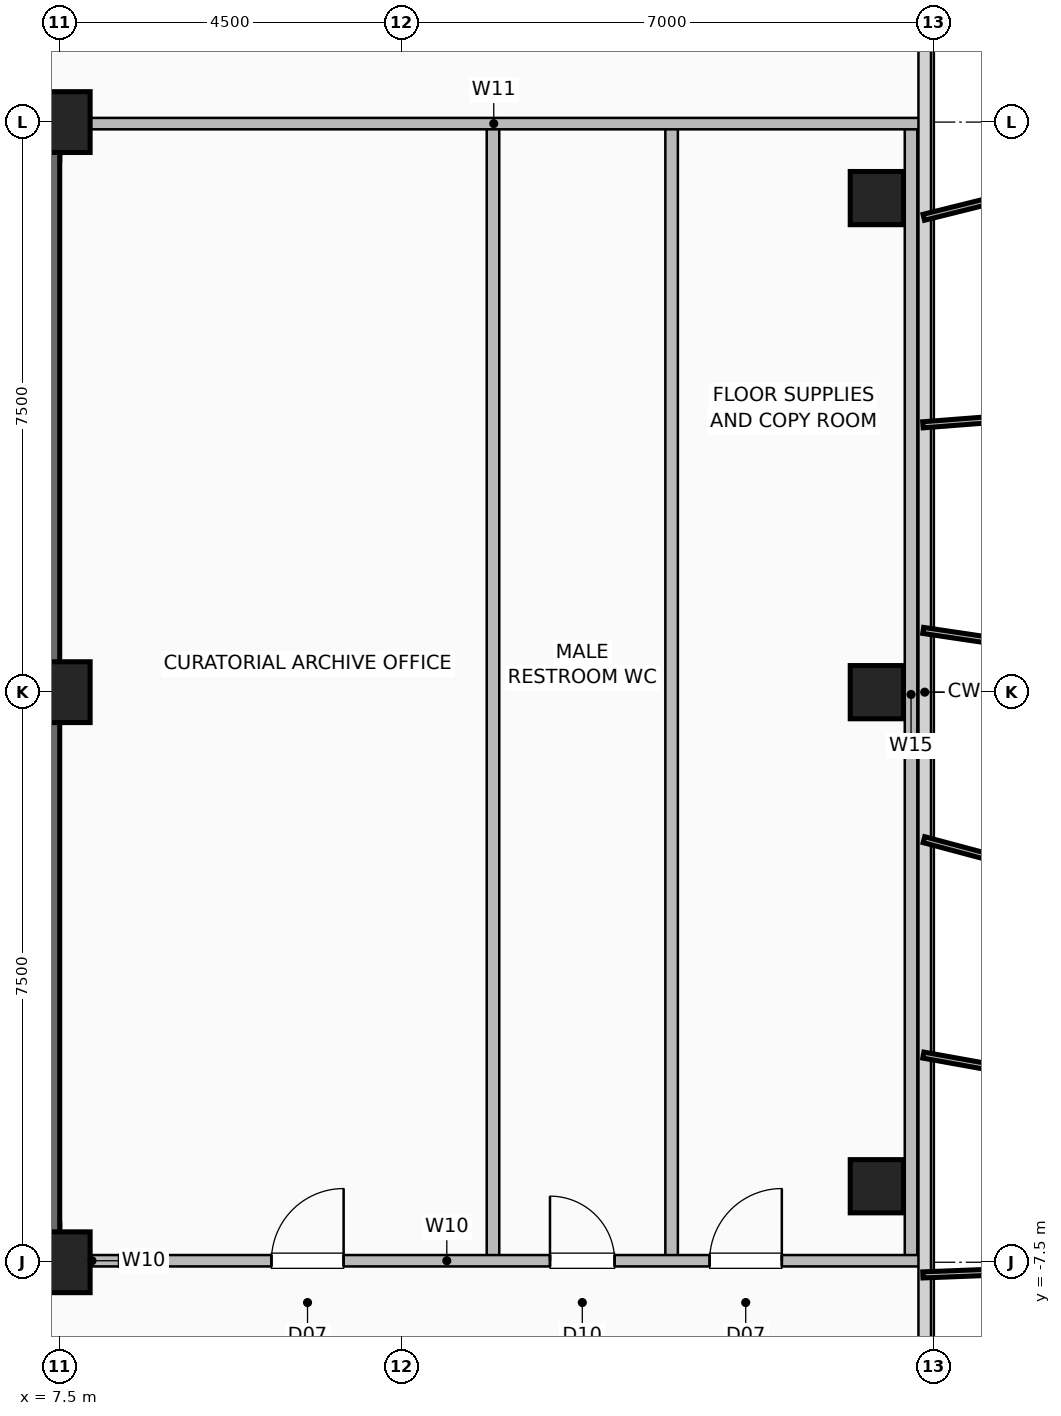
"""IFC4 building model, lengths in metres.
Left out: names, types, materials, properties, quantities, classifications, styles, units other than length and angle.
Written with IfcOpenShell. Run it as: python <this file> out.ifc"""

import sys

from ifc_helpers import new_model, si_unit, direction, frame, frame_2d, origin, origin_2d, place, context, subcontext, project, spatial, rectangle, hollow_rectangle, extrude, element, fill, save


model = new_model("IFC4")
c1 = context("Model", 3, precision=1e-05, world=origin(), true_north=direction((0.0, 1.0)))
c2 = subcontext(c1, "Body", "Model", "MODEL_VIEW")
j1 = project(units=[si_unit("LENGTHUNIT", "METRE"), si_unit("PLANEANGLEUNIT", "RADIAN")], contexts=[c1])
p1 = place(None, origin())
s1 = spatial("IfcSite", under=j1, at=p1, CompositionType="ELEMENT")
p2 = place(p1, origin())
s2 = spatial("IfcBuilding", under=s1, at=p2, CompositionType="ELEMENT")
p3 = place(p2, frame((0.0, 0.0, 272.0)))
s3 = spatial("IfcBuildingStorey", under=s2, at=p3, CompositionType="ELEMENT", Elevation=272.0)
for number, where, z_axis, x_axis in (
    (1, (7.5, -7.5, 0.0), (0.0, 0.0, 1.0), (1.0, 0.0, 0.0)),
    (2, (7.5, 0.0, 0.0), (0.0, 0.0, 1.0), (1.0, 0.0, 0.0)),
    (3, (7.5, 7.5, 0.0), (0.0, 0.0, 1.0), (1.0, 0.0, 0.0)),
):
    element("IfcColumn", number, at=place(p3, frame(where, z_axis=z_axis, x_axis=x_axis)), inside=s3, PredefinedType="COLUMN", context=c2, shape_type="SweptSolid", body=[
        extrude(hollow_rectangle(XDim=0.8, YDim=0.8, WallThickness=0.04, at=origin_2d()), origin(), (0.0, 0.0, 1.0), 3.6),
    ])
for number, where, z_axis, x_axis in (
    (4, (18.25, -6.5, 0.0), (0.0, 0.0, 1.0), (1.0, 0.0, 0.0)),
    (5, (18.25, 0.0, 0.0), (0.0, 0.0, 1.0), (1.0, 0.0, 0.0)),
    (6, (18.25, 6.5, 0.0), (0.0, 0.0, 1.0), (1.0, 0.0, 0.0)),
):
    element("IfcColumn", number, at=place(p3, frame(where, z_axis=z_axis, x_axis=x_axis)), inside=s3, PredefinedType="COLUMN", context=c2, shape_type="SweptSolid", body=[
        extrude(hollow_rectangle(XDim=0.7, YDim=0.7, WallThickness=0.035, at=origin_2d()), origin(), (0.0, 0.0, 1.0), 3.6),
    ])
p4 = place(p3, frame((-7.5, -7.25, 0.0), z_axis=(0.0, 0.0, 1.0), x_axis=(1.0, 0.0, 0.0)))
e7 = element("IfcWall", 7, at=p4, inside=s3, PredefinedType="SHEAR", context=c2, shape_type="SweptSolid", body=[
    extrude(rectangle(XDim=15.0, YDim=0.5, at=frame_2d((7.5, 0.0))), origin(), (0.0, 0.0, 1.0), 3.36),
])
p5 = place(p4, frame((1.55, 0.0, 0.0)))
e8 = element("IfcOpeningElement", 8, at=p5, cuts=e7, PredefinedType="OPENING", context=c2, shape_type="SweptSolid", body=[
    extrude(rectangle(XDim=1.05, YDim=2.08, at=frame_2d((0.525, 1.04))), frame((0.0, 0.26, 0.0), z_axis=(0.0, -1.0, 0.0), x_axis=(1.0, 0.0, 0.0)), (0.0, 0.0, 1.0), 0.52),
])
p6 = place(p4, frame((12.4, 0.0, 0.0)))
e9 = element("IfcOpeningElement", 9, at=p6, cuts=e7, PredefinedType="OPENING", context=c2, shape_type="SweptSolid", body=[
    extrude(rectangle(XDim=1.05, YDim=2.08, at=frame_2d((0.525, 1.04))), frame((0.0, 0.26, 0.0), z_axis=(0.0, -1.0, 0.0), x_axis=(1.0, 0.0, 0.0)), (0.0, 0.0, 1.0), 0.52),
])
p7 = place(p4, frame((5.2, 0.0, 0.0)))
e10 = element("IfcOpeningElement", 10, at=p7, cuts=e7, PredefinedType="OPENING", context=c2, shape_type="SweptSolid", body=[
    extrude(rectangle(XDim=1.0, YDim=2.08, at=frame_2d((0.5, 1.04))), frame((0.0, 0.26, 0.0), z_axis=(0.0, -1.0, 0.0), x_axis=(1.0, 0.0, 0.0)), (0.0, 0.0, 1.0), 0.52),
])
p8 = place(p4, frame((8.65, 0.0, 0.0)))
e11 = element("IfcOpeningElement", 11, at=p8, cuts=e7, PredefinedType="OPENING", context=c2, shape_type="SweptSolid", body=[
    extrude(rectangle(XDim=1.0, YDim=2.08, at=frame_2d((0.5, 1.04))), frame((0.0, 0.26, 0.0), z_axis=(0.0, -1.0, 0.0), x_axis=(1.0, 0.0, 0.0)), (0.0, 0.0, 1.0), 0.52),
])
for number, where, z_axis, x_axis in (
    (12, (-7.5, 7.25, 0.0), (0.0, 0.0, 1.0), (1.0, 0.0, 0.0)),
    (13, (7.25, -7.5, 0.0), (0.0, 0.0, 1.0), (0.0, 1.0, 0.0)),
):
    element("IfcWall", number, at=place(p3, frame(where, z_axis=z_axis, x_axis=x_axis)), inside=s3, PredefinedType="SHEAR", context=c2, shape_type="SweptSolid", body=[
        extrude(rectangle(XDim=15.0, YDim=0.5, at=frame_2d((7.5, 0.0))), origin(), (0.0, 0.0, 1.0), 3.36),
    ])
p9 = place(p3, frame((7.45, -7.48, 0.0), z_axis=(0.0, 0.0, 1.0), x_axis=(1.0, 0.0, 0.0)))
e14 = element("IfcWall", 14, at=p9, inside=s3, PredefinedType="PARTITIONING", context=c2, shape_type="SweptSolid", body=[
    extrude(rectangle(XDim=0.95, YDim=0.15, at=frame_2d((0.475, 0.0))), origin(), (0.0, 0.0, 1.0), 3.36),
])
for number, where, z_axis, x_axis in (
    (15, (15.55, -7.48, 0.0), (0.0, 0.0, 1.0), (0.0, 1.0, 0.0)),
    (16, (13.2, -7.48, 0.0), (0.0, 0.0, 1.0), (0.0, 1.0, 0.0)),
    (17, (18.7, -7.48, 0.0), (0.0, 0.0, 1.0), (0.0, 1.0, 0.0)),
):
    element("IfcWall", number, at=place(p3, frame(where, z_axis=z_axis, x_axis=x_axis)), inside=s3, PredefinedType="PLUMBINGWALL", context=c2, shape_type="SweptSolid", body=[
        extrude(rectangle(XDim=14.9, YDim=0.165, at=frame_2d((7.45, 0.0))), origin(), (0.0, 0.0, 1.0), 3.36),
    ])
p10 = place(p3, frame((8.28, -7.48, 0.0), z_axis=(0.0, 0.0, 1.0), x_axis=(1.0, 0.0, 0.0)))
e18 = element("IfcWall", 18, at=p10, inside=s3, PredefinedType="PARTITIONING", context=c2, shape_type="SweptSolid", body=[
    extrude(rectangle(XDim=10.54, YDim=0.15, at=frame_2d((5.27, 0.0))), origin(), (0.0, 0.0, 1.0), 3.36),
])
p11 = place(p10, frame((2.005, 0.0, 0.0)))
e19 = element("IfcOpeningElement", 19, at=p11, cuts=e18, PredefinedType="OPENING", context=c2, shape_type="SweptSolid", body=[
    extrude(rectangle(XDim=0.95, YDim=2.06, at=frame_2d((0.475, 1.03))), frame((0.0, 0.085, 0.0), z_axis=(0.0, -1.0, 0.0), x_axis=(1.0, 0.0, 0.0)), (0.0, 0.0, 1.0), 0.17),
])
p12 = place(p10, frame((5.67, 0.0, 0.0)))
e20 = element("IfcOpeningElement", 20, at=p12, cuts=e18, PredefinedType="OPENING", context=c2, shape_type="SweptSolid", body=[
    extrude(rectangle(XDim=0.85, YDim=2.05, at=frame_2d((0.425, 1.025))), frame((0.0, 0.085, 0.0), z_axis=(0.0, -1.0, 0.0), x_axis=(1.0, 0.0, 0.0)), (0.0, 0.0, 1.0), 0.17),
])
p13 = place(p10, frame((7.77, 0.0, 0.0)))
e21 = element("IfcOpeningElement", 21, at=p13, cuts=e18, PredefinedType="OPENING", context=c2, shape_type="SweptSolid", body=[
    extrude(rectangle(XDim=0.95, YDim=2.06, at=frame_2d((0.475, 1.03))), frame((0.0, 0.085, 0.0), z_axis=(0.0, -1.0, 0.0), x_axis=(1.0, 0.0, 0.0)), (0.0, 0.0, 1.0), 0.17),
])
p14 = place(p3, frame((7.6, 7.48, 0.0), z_axis=(0.0, 0.0, 1.0), x_axis=(1.0, 0.0, 0.0)))
e22 = element("IfcWall", 22, at=p14, inside=s3, PredefinedType="PARTITIONING", context=c2, shape_type="SweptSolid", body=[
    extrude(rectangle(XDim=11.22, YDim=0.15, at=frame_2d((5.61, 0.0))), origin(), (0.0, 0.0, 1.0), 3.36),
])
p15 = place(p11, origin())
e23 = element("IfcDoor", 23, at=p15, inside=s3, OperationType="SINGLE_SWING_RIGHT", PredefinedType="DOOR", context=c2, shape_type="SweptSolid", body=[
    extrude(rectangle(XDim=0.95, YDim=2.06, at=frame_2d((0.475, 1.03))), frame((0.0, 0.025, 0.0), z_axis=(0.0, -1.0, 0.0), x_axis=(1.0, 0.0, 0.0)), (0.0, 0.0, 1.0), 0.05),
])
fill(e19, e23)
p16 = place(p12, origin())
e24 = element("IfcDoor", 24, at=p16, inside=s3, OperationType="SINGLE_SWING_LEFT", PredefinedType="DOOR", context=c2, shape_type="SweptSolid", body=[
    extrude(rectangle(XDim=0.85, YDim=2.05, at=frame_2d((0.425, 1.025))), frame((0.0, 0.025, 0.0), z_axis=(0.0, -1.0, 0.0), x_axis=(1.0, 0.0, 0.0)), (0.0, 0.0, 1.0), 0.05),
])
fill(e20, e24)
p17 = place(p13, origin())
e25 = element("IfcDoor", 25, at=p17, inside=s3, OperationType="SINGLE_SWING_RIGHT", PredefinedType="DOOR", context=c2, shape_type="SweptSolid", body=[
    extrude(rectangle(XDim=0.95, YDim=2.06, at=frame_2d((0.475, 1.03))), frame((0.0, 0.025, 0.0), z_axis=(0.0, -1.0, 0.0), x_axis=(1.0, 0.0, 0.0)), (0.0, 0.0, 1.0), 0.05),
])
fill(e21, e25)
save(model, sys.argv[1])
